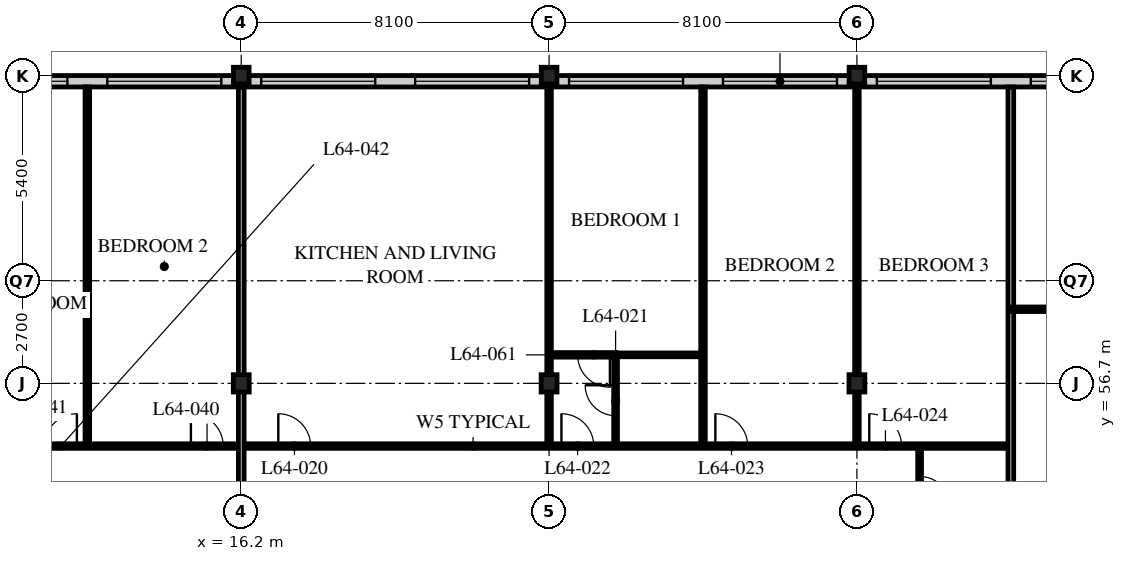
"""IFC4 building model, lengths in metres.
Left out: names, types, materials, properties, quantities, classifications, styles, units other than length and angle.
Written with IfcOpenShell. Run it as: python <this file> out.ifc"""

import sys

from ifc_helpers import new_model, si_unit, direction, frame, frame_2d, origin, origin_2d, place, context, subcontext, project, spatial, rectangle, i_section, extrude, element, fill, save


model = new_model("IFC4")
c1 = context("Model", 3, precision=1e-05, world=origin(), true_north=direction((0.0, 1.0)))
c2 = subcontext(c1, "Body", "Model", "MODEL_VIEW")
j1 = project(units=[si_unit("LENGTHUNIT", "METRE"), si_unit("PLANEANGLEUNIT", "RADIAN")], contexts=[c1])
p1 = place(None, origin())
s1 = spatial("IfcSite", under=j1, at=p1, CompositionType="ELEMENT")
p2 = place(p1, origin())
s2 = spatial("IfcBuilding", under=s1, at=p2, CompositionType="ELEMENT")
p3 = place(p2, frame((0.0, 0.0, 250.2)))
s3 = spatial("IfcBuildingStorey", under=s2, at=p3, CompositionType="ELEMENT", Elevation=250.2)
p4 = place(p3, frame((16.2, 56.7, 0.0), z_axis=(0.0, 0.0, 1.0), x_axis=(1.0, 0.0, 0.0)))
e1 = element("IfcColumn", 1, at=p4, inside=s3, PredefinedType="COLUMN", context=c2, shape_type="SweptSolid", body=[
    extrude(i_section(OverallWidth=0.418, OverallDepth=0.456, WebThickness=0.042, FlangeThickness=0.067, FilletRadius=0.015, at=origin_2d()), origin(), (0.0, 0.0, 1.0), 3.9),
])
p5 = place(p3, frame((16.2, 64.8, 0.0), z_axis=(0.0, 0.0, 1.0), x_axis=(1.0, 0.0, 0.0)))
e2 = element("IfcColumn", 2, at=p5, inside=s3, PredefinedType="COLUMN", context=c2, shape_type="SweptSolid", body=[
    extrude(i_section(OverallWidth=0.412, OverallDepth=0.437, WebThickness=0.036, FlangeThickness=0.058, FilletRadius=0.015, at=origin_2d()), origin(), (0.0, 0.0, 1.0), 3.9),
])
p6 = place(p3, frame((24.3, 56.7, 0.0), z_axis=(0.0, 0.0, 1.0), x_axis=(1.0, 0.0, 0.0)))
e3 = element("IfcColumn", 3, at=p6, inside=s3, PredefinedType="COLUMN", context=c2, shape_type="SweptSolid", body=[
    extrude(i_section(OverallWidth=0.418, OverallDepth=0.456, WebThickness=0.042, FlangeThickness=0.067, FilletRadius=0.015, at=origin_2d()), origin(), (0.0, 0.0, 1.0), 3.9),
])
p7 = place(p3, frame((24.3, 64.8, 0.0), z_axis=(0.0, 0.0, 1.0), x_axis=(1.0, 0.0, 0.0)))
e4 = element("IfcColumn", 4, at=p7, inside=s3, PredefinedType="COLUMN", context=c2, shape_type="SweptSolid", body=[
    extrude(i_section(OverallWidth=0.412, OverallDepth=0.437, WebThickness=0.036, FlangeThickness=0.058, FilletRadius=0.015, at=origin_2d()), origin(), (0.0, 0.0, 1.0), 3.9),
])
p8 = place(p3, frame((32.4, 56.7, 0.0), z_axis=(0.0, 0.0, 1.0), x_axis=(1.0, 0.0, 0.0)))
e5 = element("IfcColumn", 5, at=p8, inside=s3, PredefinedType="COLUMN", context=c2, shape_type="SweptSolid", body=[
    extrude(i_section(OverallWidth=0.418, OverallDepth=0.456, WebThickness=0.042, FlangeThickness=0.067, FilletRadius=0.015, at=origin_2d()), origin(), (0.0, 0.0, 1.0), 3.9),
])
p9 = place(p3, frame((32.4, 64.8, 0.0), z_axis=(0.0, 0.0, 1.0), x_axis=(1.0, 0.0, 0.0)))
e6 = element("IfcColumn", 6, at=p9, inside=s3, PredefinedType="COLUMN", context=c2, shape_type="SweptSolid", body=[
    extrude(i_section(OverallWidth=0.412, OverallDepth=0.437, WebThickness=0.036, FlangeThickness=0.058, FilletRadius=0.015, at=origin_2d()), origin(), (0.0, 0.0, 1.0), 3.9),
])
p10 = place(p3, frame((48.3, 64.65, 0.0), z_axis=(0.0, 0.0, 1.0), x_axis=(-1.0, 0.0, 0.0)))
e7 = element("IfcWall", 7, at=p10, inside=s3, PredefinedType="SOLIDWALL", context=c2, shape_type="SweptSolid", body=[
    extrude(rectangle(XDim=40.2, YDim=0.3, at=frame_2d((20.1, 0.0))), origin(), (0.0, 0.0, 1.0), 3.69),
])
p11 = place(p10, frame((0.225, 0.0, 0.6)))
e8 = element("IfcOpeningElement", 8, at=p11, cuts=e7, PredefinedType="OPENING", context=c2, shape_type="SweptSolid", body=[
    extrude(rectangle(XDim=3.0, YDim=2.4, at=frame_2d((1.5, 1.2))), frame((0.0, 0.16, 0.0), z_axis=(0.0, -1.0, 0.0), x_axis=(1.0, 0.0, 0.0)), (0.0, 0.0, 1.0), 0.32),
])
p12 = place(p10, frame((4.275, 0.0, 0.6)))
e9 = element("IfcOpeningElement", 9, at=p12, cuts=e7, PredefinedType="OPENING", context=c2, shape_type="SweptSolid", body=[
    extrude(rectangle(XDim=3.0, YDim=2.4, at=frame_2d((1.5, 1.2))), frame((0.0, 0.16, 0.0), z_axis=(0.0, -1.0, 0.0), x_axis=(1.0, 0.0, 0.0)), (0.0, 0.0, 1.0), 0.32),
])
p13 = place(p10, frame((8.325, 0.0, 0.6)))
e10 = element("IfcOpeningElement", 10, at=p13, cuts=e7, PredefinedType="OPENING", context=c2, shape_type="SweptSolid", body=[
    extrude(rectangle(XDim=3.0, YDim=2.4, at=frame_2d((1.5, 1.2))), frame((0.0, 0.16, 0.0), z_axis=(0.0, -1.0, 0.0), x_axis=(1.0, 0.0, 0.0)), (0.0, 0.0, 1.0), 0.32),
])
p14 = place(p10, frame((12.375, 0.0, 0.6)))
e11 = element("IfcOpeningElement", 11, at=p14, cuts=e7, PredefinedType="OPENING", context=c2, shape_type="SweptSolid", body=[
    extrude(rectangle(XDim=3.0, YDim=2.4, at=frame_2d((1.5, 1.2))), frame((0.0, 0.16, 0.0), z_axis=(0.0, -1.0, 0.0), x_axis=(1.0, 0.0, 0.0)), (0.0, 0.0, 1.0), 0.32),
])
p15 = place(p10, frame((16.425, 0.0, 0.6)))
e12 = element("IfcOpeningElement", 12, at=p15, cuts=e7, PredefinedType="OPENING", context=c2, shape_type="SweptSolid", body=[
    extrude(rectangle(XDim=3.0, YDim=2.4, at=frame_2d((1.5, 1.2))), frame((0.0, 0.16, 0.0), z_axis=(0.0, -1.0, 0.0), x_axis=(1.0, 0.0, 0.0)), (0.0, 0.0, 1.0), 0.32),
])
p16 = place(p10, frame((20.475, 0.0, 0.6)))
e13 = element("IfcOpeningElement", 13, at=p16, cuts=e7, PredefinedType="OPENING", context=c2, shape_type="SweptSolid", body=[
    extrude(rectangle(XDim=3.0, YDim=2.4, at=frame_2d((1.5, 1.2))), frame((0.0, 0.16, 0.0), z_axis=(0.0, -1.0, 0.0), x_axis=(1.0, 0.0, 0.0)), (0.0, 0.0, 1.0), 0.32),
])
p17 = place(p10, frame((24.525, 0.0, 0.6)))
e14 = element("IfcOpeningElement", 14, at=p17, cuts=e7, PredefinedType="OPENING", context=c2, shape_type="SweptSolid", body=[
    extrude(rectangle(XDim=3.0, YDim=2.4, at=frame_2d((1.5, 1.2))), frame((0.0, 0.16, 0.0), z_axis=(0.0, -1.0, 0.0), x_axis=(1.0, 0.0, 0.0)), (0.0, 0.0, 1.0), 0.32),
])
p18 = place(p10, frame((28.575, 0.0, 0.6)))
e15 = element("IfcOpeningElement", 15, at=p18, cuts=e7, PredefinedType="OPENING", context=c2, shape_type="SweptSolid", body=[
    extrude(rectangle(XDim=3.0, YDim=2.4, at=frame_2d((1.5, 1.2))), frame((0.0, 0.16, 0.0), z_axis=(0.0, -1.0, 0.0), x_axis=(1.0, 0.0, 0.0)), (0.0, 0.0, 1.0), 0.32),
])
p19 = place(p10, frame((32.625, 0.0, 0.6)))
e16 = element("IfcOpeningElement", 16, at=p19, cuts=e7, PredefinedType="OPENING", context=c2, shape_type="SweptSolid", body=[
    extrude(rectangle(XDim=3.0, YDim=2.4, at=frame_2d((1.5, 1.2))), frame((0.0, 0.16, 0.0), z_axis=(0.0, -1.0, 0.0), x_axis=(1.0, 0.0, 0.0)), (0.0, 0.0, 1.0), 0.32),
])
p20 = place(p10, frame((36.675, 0.0, 0.6)))
e17 = element("IfcOpeningElement", 17, at=p20, cuts=e7, PredefinedType="OPENING", context=c2, shape_type="SweptSolid", body=[
    extrude(rectangle(XDim=3.0, YDim=2.4, at=frame_2d((1.5, 1.2))), frame((0.0, 0.16, 0.0), z_axis=(0.0, -1.0, 0.0), x_axis=(1.0, 0.0, 0.0)), (0.0, 0.0, 1.0), 0.32),
])
p21 = place(p3, frame((34.05, 52.65, 0.0), z_axis=(0.0, 0.0, 1.0), x_axis=(0.0, 1.0, 0.0)))
e18 = element("IfcWall", 18, at=p21, inside=s3, PredefinedType="PARTITIONING", context=c2, shape_type="SweptSolid", body=[
    extrude(rectangle(XDim=2.4, YDim=0.1, at=frame_2d((1.2, 0.0))), origin(), (0.0, 0.0, 1.0), 3.69),
])
p22 = place(p21, frame((0.8, 0.0, 0.0)))
e19 = element("IfcOpeningElement", 19, at=p22, cuts=e18, PredefinedType="OPENING", context=c2, shape_type="SweptSolid", body=[
    extrude(rectangle(XDim=0.8, YDim=2.1, at=frame_2d((0.4, 1.05))), frame((0.0, 0.06, 0.0), z_axis=(0.0, -1.0, 0.0), x_axis=(1.0, 0.0, 0.0)), (0.0, 0.0, 1.0), 0.12),
])
p23 = place(p3, frame((26.05, 55.05, 0.0), z_axis=(0.0, 0.0, 1.0), x_axis=(0.0, 1.0, 0.0)))
e20 = element("IfcWall", 20, at=p23, inside=s3, PredefinedType="PARTITIONING", context=c2, shape_type="SweptSolid", body=[
    extrude(rectangle(XDim=2.4, YDim=0.1, at=frame_2d((1.2, 0.0))), origin(), (0.0, 0.0, 1.0), 3.69),
])
p24 = place(p23, frame((0.8, 0.0, 0.0)))
e21 = element("IfcOpeningElement", 21, at=p24, cuts=e20, PredefinedType="OPENING", context=c2, shape_type="SweptSolid", body=[
    extrude(rectangle(XDim=0.8, YDim=2.1, at=frame_2d((0.4, 1.05))), frame((0.0, 0.06, 0.0), z_axis=(0.0, -1.0, 0.0), x_axis=(1.0, 0.0, 0.0)), (0.0, 0.0, 1.0), 0.12),
])
p25 = place(p3, frame((26.05, 57.45, 0.0), z_axis=(0.0, 0.0, 1.0), x_axis=(1.0, 0.0, 0.0)))
e22 = element("IfcWall", 22, at=p25, inside=s3, PredefinedType="PARTITIONING", context=c2, shape_type="SweptSolid", body=[
    extrude(rectangle(XDim=2.3, YDim=0.1, at=frame_2d((1.15, 0.0))), origin(), (0.0, 0.0, 1.0), 3.69),
])
p26 = place(p3, frame((24.3, 55.05, 0.0), z_axis=(0.0, 0.0, 1.0), x_axis=(0.0, 1.0, 0.0)))
e23 = element("IfcWall", 23, at=p26, inside=s3, PredefinedType="PARTITIONING", context=c2, shape_type="SweptSolid", body=[
    extrude(rectangle(XDim=9.45, YDim=0.12, at=frame_2d((4.725, 0.0))), origin(), (0.0, 0.0, 1.0), 3.078),
])
p27 = place(p3, frame((28.35, 55.05, 0.0), z_axis=(0.0, 0.0, 1.0), x_axis=(0.0, 1.0, 0.0)))
e24 = element("IfcWall", 24, at=p27, inside=s3, PredefinedType="PARTITIONING", context=c2, shape_type="SweptSolid", body=[
    extrude(rectangle(XDim=9.45, YDim=0.12, at=frame_2d((4.725, 0.0))), origin(), (0.0, 0.0, 1.0), 3.69),
])
p28 = place(p3, frame((32.4, 55.05, 0.0), z_axis=(0.0, 0.0, 1.0), x_axis=(0.0, 1.0, 0.0)))
e25 = element("IfcWall", 25, at=p28, inside=s3, PredefinedType="PARTITIONING", context=c2, shape_type="SweptSolid", body=[
    extrude(rectangle(XDim=9.45, YDim=0.12, at=frame_2d((4.725, 0.0))), origin(), (0.0, 0.0, 1.0), 3.078),
])
p29 = place(p3, frame((8.15, 55.05, 0.0), z_axis=(0.0, 0.0, 1.0), x_axis=(1.0, 0.0, 0.0)))
e26 = element("IfcWall", 26, at=p29, inside=s3, PredefinedType="PARTITIONING", context=c2, shape_type="SweptSolid", body=[
    extrude(rectangle(XDim=28.3, YDim=0.12, at=frame_2d((14.15, 0.0))), origin(), (0.0, 0.0, 1.0), 3.69),
])
p30 = place(p29, frame((9.025, 0.0, 0.0)))
e27 = element("IfcOpeningElement", 27, at=p30, cuts=e26, PredefinedType="OPENING", context=c2, shape_type="SweptSolid", body=[
    extrude(rectangle(XDim=0.85, YDim=2.1, at=frame_2d((0.425, 1.05))), frame((0.0, 0.07, 0.0), z_axis=(0.0, -1.0, 0.0), x_axis=(1.0, 0.0, 0.0)), (0.0, 0.0, 1.0), 0.14),
])
p31 = place(p29, frame((16.475, 0.0, 0.0)))
e28 = element("IfcOpeningElement", 28, at=p31, cuts=e26, PredefinedType="OPENING", context=c2, shape_type="SweptSolid", body=[
    extrude(rectangle(XDim=0.85, YDim=2.1, at=frame_2d((0.425, 1.05))), frame((0.0, 0.07, 0.0), z_axis=(0.0, -1.0, 0.0), x_axis=(1.0, 0.0, 0.0)), (0.0, 0.0, 1.0), 0.14),
])
p32 = place(p29, frame((20.525, 0.0, 0.0)))
e29 = element("IfcOpeningElement", 29, at=p32, cuts=e26, PredefinedType="OPENING", context=c2, shape_type="SweptSolid", body=[
    extrude(rectangle(XDim=0.85, YDim=2.1, at=frame_2d((0.425, 1.05))), frame((0.0, 0.07, 0.0), z_axis=(0.0, -1.0, 0.0), x_axis=(1.0, 0.0, 0.0)), (0.0, 0.0, 1.0), 0.14),
])
p33 = place(p29, frame((24.575, 0.0, 0.0)))
e30 = element("IfcOpeningElement", 30, at=p33, cuts=e26, PredefinedType="OPENING", context=c2, shape_type="SweptSolid", body=[
    extrude(rectangle(XDim=0.85, YDim=2.1, at=frame_2d((0.425, 1.05))), frame((0.0, 0.07, 0.0), z_axis=(0.0, -1.0, 0.0), x_axis=(1.0, 0.0, 0.0)), (0.0, 0.0, 1.0), 0.14),
])
p34 = place(p29, frame((6.725, 0.0, 0.0)))
e31 = element("IfcOpeningElement", 31, at=p34, cuts=e26, PredefinedType="OPENING", context=c2, shape_type="SweptSolid", body=[
    extrude(rectangle(XDim=0.85, YDim=2.1, at=frame_2d((0.425, 1.05))), frame((0.0, 0.07, 0.0), z_axis=(0.0, -1.0, 0.0), x_axis=(1.0, 0.0, 0.0)), (0.0, 0.0, 1.0), 0.14),
])
p35 = place(p29, frame((2.875, 0.0, 0.0)))
e32 = element("IfcOpeningElement", 32, at=p35, cuts=e26, PredefinedType="OPENING", context=c2, shape_type="SweptSolid", body=[
    extrude(rectangle(XDim=0.85, YDim=2.1, at=frame_2d((0.425, 1.05))), frame((0.0, 0.07, 0.0), z_axis=(0.0, -1.0, 0.0), x_axis=(1.0, 0.0, 0.0)), (0.0, 0.0, 1.0), 0.14),
])
p36 = place(p3, frame((12.15, 55.05, 0.0), z_axis=(0.0, 0.0, 1.0), x_axis=(0.0, 1.0, 0.0)))
e33 = element("IfcWall", 33, at=p36, inside=s3, PredefinedType="PARTITIONING", context=c2, shape_type="SweptSolid", body=[
    extrude(rectangle(XDim=9.45, YDim=0.12, at=frame_2d((4.725, 0.0))), origin(), (0.0, 0.0, 1.0), 3.69),
])
p37 = place(p3, frame((16.2, 52.65, 0.0), z_axis=(0.0, 0.0, 1.0), x_axis=(0.0, 1.0, 0.0)))
e34 = element("IfcWall", 34, at=p37, inside=s3, PredefinedType="PARTITIONING", context=c2, shape_type="SweptSolid", body=[
    extrude(rectangle(XDim=11.85, YDim=0.15, at=frame_2d((5.925, 0.0))), origin(), (0.0, 0.0, 1.0), 3.078),
])
p38 = place(p3, frame((36.45, 64.5, 0.0), z_axis=(0.0, 0.0, 1.0), x_axis=(0.0, -1.0, 0.0)))
e35 = element("IfcWall", 35, at=p38, inside=s3, PredefinedType="PARTITIONING", context=c2, shape_type="SweptSolid", body=[
    extrude(rectangle(XDim=11.85, YDim=0.15, at=frame_2d((5.925, 0.0))), origin(), (0.0, 0.0, 1.0), 3.69),
])
p39 = place(p3, frame((36.45, 58.65, 0.0), z_axis=(0.0, 0.0, 1.0), x_axis=(1.0, 0.0, 0.0)))
e36 = element("IfcWall", 36, at=p39, inside=s3, PredefinedType="PARTITIONING", context=c2, shape_type="SweptSolid", body=[
    extrude(rectangle(XDim=15.9, YDim=0.12, at=frame_2d((7.95, 0.0))), origin(), (0.0, 0.0, 1.0), 3.69),
])
p40 = place(p39, frame((1.675, 0.0, 0.0)))
e37 = element("IfcOpeningElement", 37, at=p40, cuts=e36, PredefinedType="OPENING", context=c2, shape_type="SweptSolid", body=[
    extrude(rectangle(XDim=0.85, YDim=2.1, at=frame_2d((0.425, 1.05))), frame((0.0, 0.07, 0.0), z_axis=(0.0, -1.0, 0.0), x_axis=(1.0, 0.0, 0.0)), (0.0, 0.0, 1.0), 0.14),
])
p41 = place(p3, frame((24.3, 57.45, 0.0), z_axis=(0.0, 0.0, 1.0), x_axis=(1.0, 0.0, 0.0)))
e38 = element("IfcWall", 38, at=p41, inside=s3, PredefinedType="PARTITIONING", context=c2, shape_type="SweptSolid", body=[
    extrude(rectangle(XDim=1.76, YDim=0.12, at=frame_2d((0.88, 0.0))), origin(), (0.0, 0.0, 1.0), 3.69),
])
p42 = place(p41, frame((0.75, 0.0, 0.0)))
e39 = element("IfcOpeningElement", 39, at=p42, cuts=e38, PredefinedType="OPENING", context=c2, shape_type="SweptSolid", body=[
    extrude(rectangle(XDim=0.85, YDim=2.1, at=frame_2d((0.425, 1.05))), frame((0.0, 0.07, 0.0), z_axis=(0.0, -1.0, 0.0), x_axis=(1.0, 0.0, 0.0)), (0.0, 0.0, 1.0), 0.14),
])
p43 = place(p13, origin())
e40 = element("IfcWindow", 40, at=p43, inside=s3, PartitioningType="SINGLE_PANEL", PredefinedType="WINDOW", context=c2, shape_type="SweptSolid", body=[
    extrude(rectangle(XDim=3.0, YDim=2.4, at=frame_2d((1.5, 1.2))), frame((0.0, 0.03, 0.0), z_axis=(0.0, -1.0, 0.0), x_axis=(1.0, 0.0, 0.0)), (0.0, 0.0, 1.0), 0.06),
])
fill(e10, e40)
p44 = place(p14, origin())
e41 = element("IfcWindow", 41, at=p44, inside=s3, PartitioningType="SINGLE_PANEL", PredefinedType="WINDOW", context=c2, shape_type="SweptSolid", body=[
    extrude(rectangle(XDim=3.0, YDim=2.4, at=frame_2d((1.5, 1.2))), frame((0.0, 0.03, 0.0), z_axis=(0.0, -1.0, 0.0), x_axis=(1.0, 0.0, 0.0)), (0.0, 0.0, 1.0), 0.06),
])
fill(e11, e41)
p45 = place(p15, origin())
e42 = element("IfcWindow", 42, at=p45, inside=s3, PartitioningType="SINGLE_PANEL", PredefinedType="WINDOW", context=c2, shape_type="SweptSolid", body=[
    extrude(rectangle(XDim=3.0, YDim=2.4, at=frame_2d((1.5, 1.2))), frame((0.0, 0.03, 0.0), z_axis=(0.0, -1.0, 0.0), x_axis=(1.0, 0.0, 0.0)), (0.0, 0.0, 1.0), 0.06),
])
fill(e12, e42)
p46 = place(p16, origin())
e43 = element("IfcWindow", 43, at=p46, inside=s3, PartitioningType="SINGLE_PANEL", PredefinedType="WINDOW", context=c2, shape_type="SweptSolid", body=[
    extrude(rectangle(XDim=3.0, YDim=2.4, at=frame_2d((1.5, 1.2))), frame((0.0, 0.03, 0.0), z_axis=(0.0, -1.0, 0.0), x_axis=(1.0, 0.0, 0.0)), (0.0, 0.0, 1.0), 0.06),
])
fill(e13, e43)
p47 = place(p17, origin())
e44 = element("IfcWindow", 44, at=p47, inside=s3, PartitioningType="SINGLE_PANEL", PredefinedType="WINDOW", context=c2, shape_type="SweptSolid", body=[
    extrude(rectangle(XDim=3.0, YDim=2.4, at=frame_2d((1.5, 1.2))), frame((0.0, 0.03, 0.0), z_axis=(0.0, -1.0, 0.0), x_axis=(1.0, 0.0, 0.0)), (0.0, 0.0, 1.0), 0.06),
])
fill(e14, e44)
p48 = place(p18, origin())
e45 = element("IfcWindow", 45, at=p48, inside=s3, PartitioningType="SINGLE_PANEL", PredefinedType="WINDOW", context=c2, shape_type="SweptSolid", body=[
    extrude(rectangle(XDim=3.0, YDim=2.4, at=frame_2d((1.5, 1.2))), frame((0.0, 0.03, 0.0), z_axis=(0.0, -1.0, 0.0), x_axis=(1.0, 0.0, 0.0)), (0.0, 0.0, 1.0), 0.06),
])
fill(e15, e45)
p49 = place(p19, origin())
e46 = element("IfcWindow", 46, at=p49, inside=s3, PartitioningType="SINGLE_PANEL", PredefinedType="WINDOW", context=c2, shape_type="SweptSolid", body=[
    extrude(rectangle(XDim=3.0, YDim=2.4, at=frame_2d((1.5, 1.2))), frame((0.0, 0.03, 0.0), z_axis=(0.0, -1.0, 0.0), x_axis=(1.0, 0.0, 0.0)), (0.0, 0.0, 1.0), 0.06),
])
fill(e16, e46)
p50 = place(p20, origin())
e47 = element("IfcWindow", 47, at=p50, inside=s3, PartitioningType="SINGLE_PANEL", PredefinedType="WINDOW", context=c2, shape_type="SweptSolid", body=[
    extrude(rectangle(XDim=3.0, YDim=2.4, at=frame_2d((1.5, 1.2))), frame((0.0, 0.03, 0.0), z_axis=(0.0, -1.0, 0.0), x_axis=(1.0, 0.0, 0.0)), (0.0, 0.0, 1.0), 0.06),
])
fill(e17, e47)
p51 = place(p22, origin())
e48 = element("IfcDoor", 48, at=p51, inside=s3, OperationType="SINGLE_SWING_RIGHT", PredefinedType="DOOR", context=c2, shape_type="SweptSolid", body=[
    extrude(rectangle(XDim=0.8, YDim=2.1, at=frame_2d((0.4, 1.05))), frame((0.0, 0.025, 0.0), z_axis=(0.0, -1.0, 0.0), x_axis=(1.0, 0.0, 0.0)), (0.0, 0.0, 1.0), 0.05),
])
fill(e19, e48)
p52 = place(p30, origin())
e49 = element("IfcDoor", 49, at=p52, inside=s3, OperationType="SINGLE_SWING_LEFT", PredefinedType="DOOR", context=c2, shape_type="SweptSolid", body=[
    extrude(rectangle(XDim=0.85, YDim=2.1, at=frame_2d((0.425, 1.05))), frame((0.0, 0.025, 0.0), z_axis=(0.0, -1.0, 0.0), x_axis=(1.0, 0.0, 0.0)), (0.0, 0.0, 1.0), 0.05),
])
fill(e27, e49)
p53 = place(p24, origin())
e50 = element("IfcDoor", 50, at=p53, inside=s3, OperationType="SINGLE_SWING_RIGHT", PredefinedType="DOOR", context=c2, shape_type="SweptSolid", body=[
    extrude(rectangle(XDim=0.8, YDim=2.1, at=frame_2d((0.4, 1.05))), frame((0.0, 0.025, 0.0), z_axis=(0.0, -1.0, 0.0), x_axis=(1.0, 0.0, 0.0)), (0.0, 0.0, 1.0), 0.05),
])
fill(e21, e50)
p54 = place(p31, origin())
e51 = element("IfcDoor", 51, at=p54, inside=s3, OperationType="SINGLE_SWING_LEFT", PredefinedType="DOOR", context=c2, shape_type="SweptSolid", body=[
    extrude(rectangle(XDim=0.85, YDim=2.1, at=frame_2d((0.425, 1.05))), frame((0.0, 0.025, 0.0), z_axis=(0.0, -1.0, 0.0), x_axis=(1.0, 0.0, 0.0)), (0.0, 0.0, 1.0), 0.05),
])
fill(e28, e51)
p55 = place(p32, origin())
e52 = element("IfcDoor", 52, at=p55, inside=s3, OperationType="SINGLE_SWING_LEFT", PredefinedType="DOOR", context=c2, shape_type="SweptSolid", body=[
    extrude(rectangle(XDim=0.85, YDim=2.1, at=frame_2d((0.425, 1.05))), frame((0.0, 0.025, 0.0), z_axis=(0.0, -1.0, 0.0), x_axis=(1.0, 0.0, 0.0)), (0.0, 0.0, 1.0), 0.05),
])
fill(e29, e52)
p56 = place(p33, origin())
e53 = element("IfcDoor", 53, at=p56, inside=s3, OperationType="SINGLE_SWING_LEFT", PredefinedType="DOOR", context=c2, shape_type="SweptSolid", body=[
    extrude(rectangle(XDim=0.85, YDim=2.1, at=frame_2d((0.425, 1.05))), frame((0.0, 0.025, 0.0), z_axis=(0.0, -1.0, 0.0), x_axis=(1.0, 0.0, 0.0)), (0.0, 0.0, 1.0), 0.05),
])
fill(e30, e53)
p57 = place(p34, origin())
e54 = element("IfcDoor", 54, at=p57, inside=s3, OperationType="SINGLE_SWING_LEFT", PredefinedType="DOOR", context=c2, shape_type="SweptSolid", body=[
    extrude(rectangle(XDim=0.85, YDim=2.1, at=frame_2d((0.425, 1.05))), frame((0.0, 0.025, 0.0), z_axis=(0.0, -1.0, 0.0), x_axis=(1.0, 0.0, 0.0)), (0.0, 0.0, 1.0), 0.05),
])
fill(e31, e54)
p58 = place(p35, origin())
e55 = element("IfcDoor", 55, at=p58, inside=s3, OperationType="SINGLE_SWING_RIGHT", PredefinedType="DOOR", context=c2, shape_type="SweptSolid", body=[
    extrude(rectangle(XDim=0.85, YDim=2.1, at=frame_2d((0.425, 1.05))), frame((0.0, 0.025, 0.0), z_axis=(0.0, -1.0, 0.0), x_axis=(1.0, 0.0, 0.0)), (0.0, 0.0, 1.0), 0.05),
])
fill(e32, e55)
p59 = place(p42, origin())
e56 = element("IfcDoor", 56, at=p59, inside=s3, OperationType="SINGLE_SWING_LEFT", PredefinedType="DOOR", context=c2, shape_type="SweptSolid", body=[
    extrude(rectangle(XDim=0.85, YDim=2.1, at=frame_2d((0.425, 1.05))), frame((0.0, 0.025, 0.0), z_axis=(0.0, -1.0, 0.0), x_axis=(1.0, 0.0, 0.0)), (0.0, 0.0, 1.0), 0.05),
])
fill(e39, e56)
save(model, sys.argv[1])
